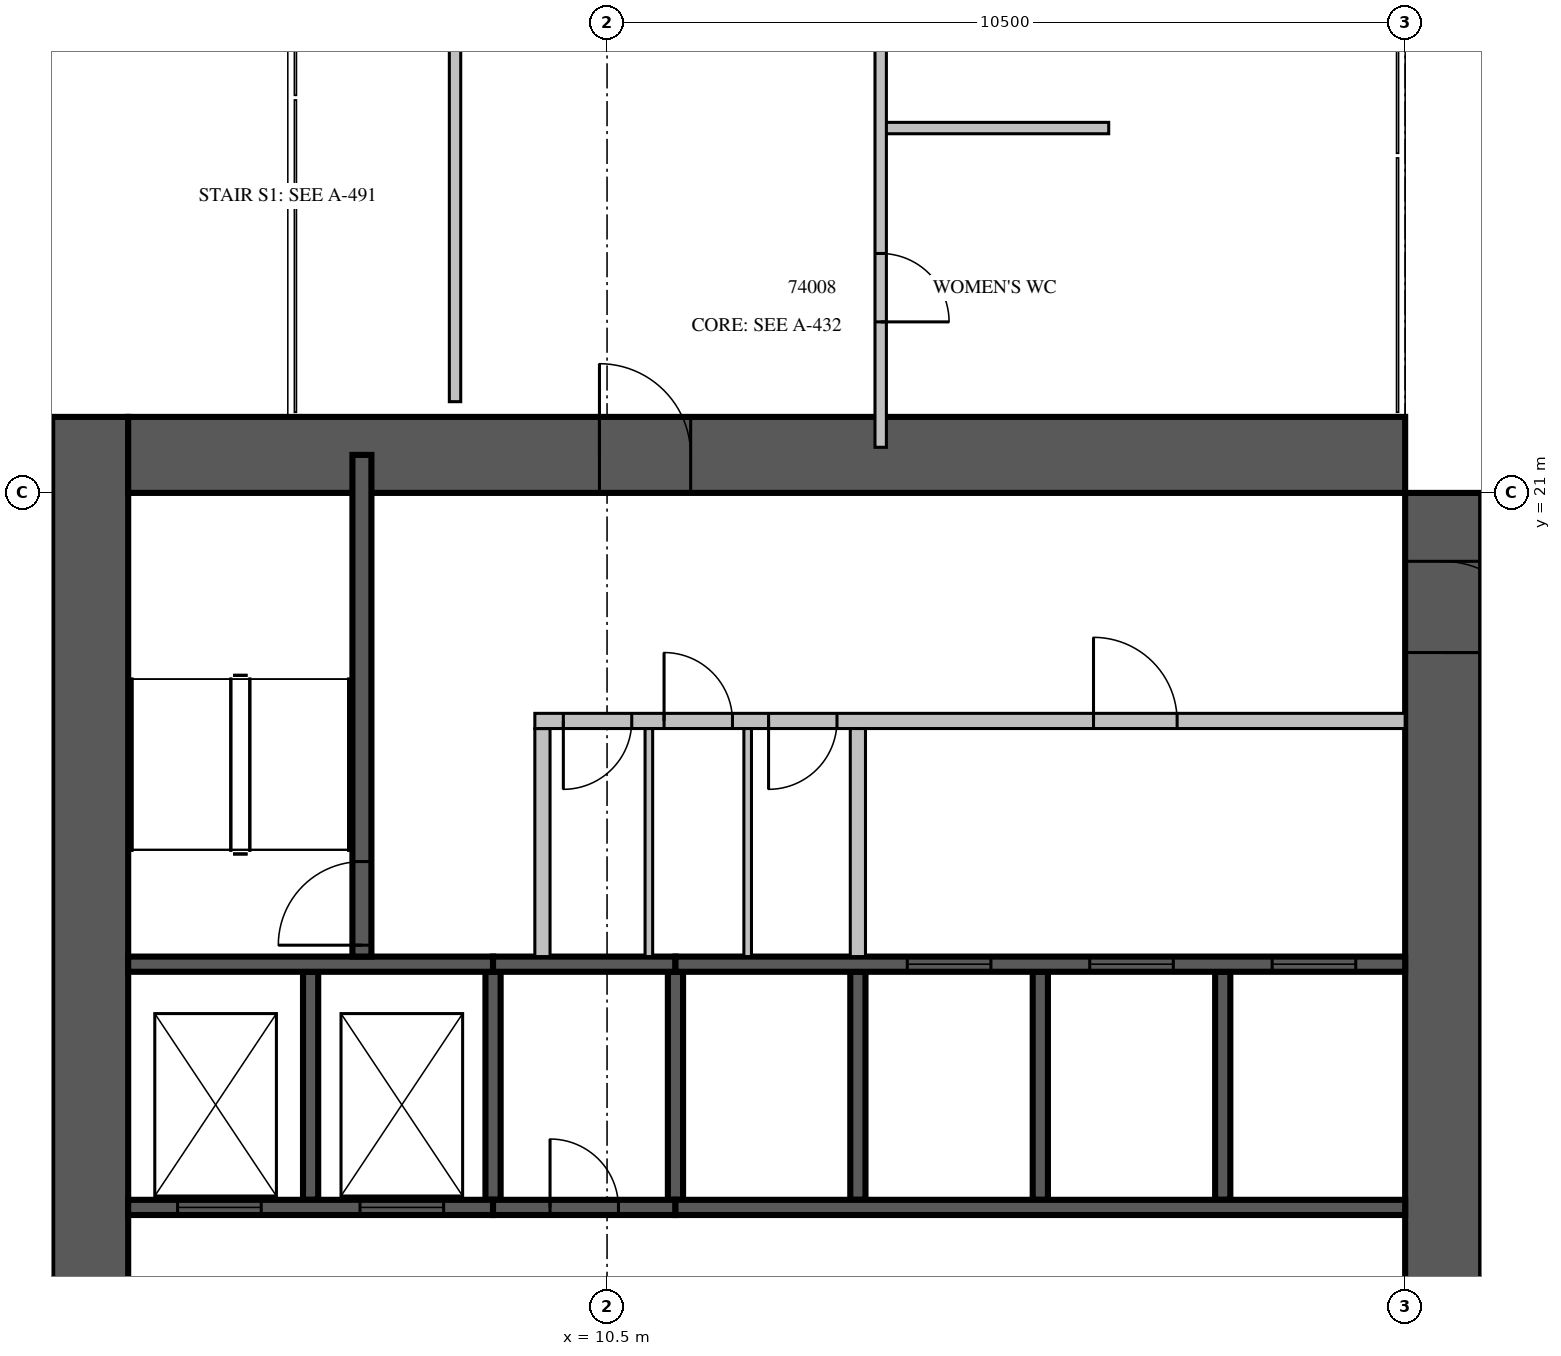
"""IFC4 building model, lengths in metres.
Left out: names, types, materials, properties, quantities, classifications, styles, units other than length and angle.
Written with IfcOpenShell. Run it as: python <this file> out.ifc"""

import sys

from ifc_helpers import new_model, si_unit, direction, frame, frame_2d, origin, place, context, subcontext, project, spatial, rectangle, extrude, source, transform, mapped, element, fill, save


model = new_model("IFC4")
c1 = context("Model", 3, precision=1e-05, world=origin(), true_north=direction((0.0, 1.0)))
c2 = subcontext(c1, "Body", "Model", "MODEL_VIEW")
j1 = project(units=[si_unit("LENGTHUNIT", "METRE"), si_unit("PLANEANGLEUNIT", "RADIAN")], contexts=[c1])
p1 = place(None, origin())
s1 = spatial("IfcSite", under=j1, at=p1, CompositionType="ELEMENT")
p2 = place(p1, origin())
s2 = spatial("IfcBuilding", under=s1, at=p2, CompositionType="ELEMENT")
p3 = place(p2, frame((0.0, 0.0, 170.3)))
s3 = spatial("IfcBuildingStorey", under=s2, at=p3, CompositionType="ELEMENT", Elevation=170.3)
p4 = place(p3, frame((3.7, 4.2, 0.0), z_axis=(0.0, 0.0, 1.0), x_axis=(0.0, 1.0, 0.0)))
e1 = element("IfcWall", 1, at=p4, inside=s3, PredefinedType="SHEAR", context=c2, shape_type="SweptSolid", body=[
    extrude(rectangle(XDim=17.8, YDim=1.0, at=frame_2d((8.9, 0.0))), origin(), (0.0, 0.0, 1.0), 7.5),
])
m1 = source(origin(), c2, "Body", "SweptSolid", [
    extrude(rectangle(XDim=2.2, YDim=2.1, at=frame_2d((1.1, 1.05))), frame((0.0, 0.51, 0.0), z_axis=(0.0, -1.0, 0.0), x_axis=(1.0, 0.0, 0.0)), (0.0, 0.0, 1.0), 1.02),
])
p5 = place(p4, frame((4.2, 0.0, 0.0)))
e2 = element("IfcOpeningElement", 2, at=p5, cuts=e1, PredefinedType="OPENING", context=c2, shape_type="MappedRepresentation", body=[
    mapped(m1, transform((0.0, 0.0, 0.0), scale=1.0)),
])
p6 = place(p3, frame((21.5, 4.2, 0.0), z_axis=(0.0, 0.0, 1.0), x_axis=(0.0, 1.0, 0.0)))
e3 = element("IfcWall", 3, at=p6, inside=s3, PredefinedType="SHEAR", context=c2, shape_type="SweptSolid", body=[
    extrude(rectangle(XDim=16.8, YDim=1.0, at=frame_2d((8.4, 0.0))), origin(), (0.0, 0.0, 1.0), 7.5),
])
p7 = place(p6, frame((4.2, 0.0, 0.0)))
e4 = element("IfcOpeningElement", 4, at=p7, cuts=e3, PredefinedType="OPENING", context=c2, shape_type="MappedRepresentation", body=[
    mapped(m1, transform((0.0, 0.0, 0.0), scale=1.0)),
])
m2 = source(origin(), c2, "Body", "SweptSolid", [
    extrude(rectangle(XDim=1.2, YDim=2.1, at=frame_2d((0.6, 1.05))), frame((0.0, 0.51, 0.0), z_axis=(0.0, -1.0, 0.0), x_axis=(1.0, 0.0, 0.0)), (0.0, 0.0, 1.0), 1.02),
])
p8 = place(p6, frame((14.7, 0.0, 0.0)))
e5 = element("IfcOpeningElement", 5, at=p8, cuts=e3, PredefinedType="OPENING", context=c2, shape_type="MappedRepresentation", body=[
    mapped(m2, transform((0.0, 0.0, 0.0), scale=1.0)),
])
m3 = source(origin(), c2, "Body", "SweptSolid", [
    extrude(rectangle(XDim=16.8, YDim=1.0, at=frame_2d((8.4, 0.0))), origin(), (0.0, 0.0, 1.0), 7.5),
])
p9 = place(p3, frame((4.2, 21.5, 0.0), z_axis=(0.0, 0.0, 1.0), x_axis=(1.0, 0.0, 0.0)))
e6 = element("IfcWall", 6, at=p9, inside=s3, PredefinedType="SHEAR", context=c2, shape_type="MappedRepresentation", body=[
    mapped(m3, transform((0.0, 0.0, 0.0), scale=1.0)),
])
p10 = place(p9, frame((6.2, 0.0, 0.0)))
e7 = element("IfcOpeningElement", 7, at=p10, cuts=e6, PredefinedType="OPENING", context=c2, shape_type="MappedRepresentation", body=[
    mapped(m2, transform((0.0, 0.0, 0.0), scale=1.0)),
])
m4 = source(origin(), c2, "Body", "SweptSolid", [
    extrude(rectangle(XDim=3.0, YDim=0.2, at=frame_2d((1.5, 0.0))), origin(), (0.0, 0.0, 1.0), 7.5),
])
p11 = place(p3, frame((6.6, 11.7, 0.0), z_axis=(0.0, 0.0, 1.0), x_axis=(0.0, 1.0, 0.0)))
e8 = element("IfcWall", 8, at=p11, inside=s3, PredefinedType="SOLIDWALL", context=c2, shape_type="MappedRepresentation", body=[
    mapped(m4, transform((0.0, 0.0, 0.0), scale=1.0)),
])
p12 = place(p3, frame((9.0, 11.7, 0.0), z_axis=(0.0, 0.0, 1.0), x_axis=(0.0, 1.0, 0.0)))
e9 = element("IfcWall", 9, at=p12, inside=s3, PredefinedType="SOLIDWALL", context=c2, shape_type="SweptSolid", body=[
    extrude(rectangle(XDim=3.0, YDim=0.2, at=frame_2d((1.5, 0.0))), origin(), (0.0, 0.0, 1.0), 7.1),
])
m5 = source(origin(), c2, "Body", "SweptSolid", [
    extrude(rectangle(XDim=3.0, YDim=0.2, at=frame_2d((1.5, 0.0))), origin(), (0.0, 0.0, 1.0), 7.1),
])
p13 = place(p3, frame((11.4, 11.7, 0.0), z_axis=(0.0, 0.0, 1.0), x_axis=(0.0, 1.0, 0.0)))
e10 = element("IfcWall", 10, at=p13, inside=s3, PredefinedType="SOLIDWALL", context=c2, shape_type="MappedRepresentation", body=[
    mapped(m5, transform((0.0, 0.0, 0.0), scale=1.0)),
])
for number, where, z_axis, x_axis in (
    (11, (13.8, 11.7, 0.0), (0.0, 0.0, 1.0), (0.0, 1.0, 0.0)),
    (12, (16.2, 11.7, 0.0), (0.0, 0.0, 1.0), (0.0, 1.0, 0.0)),
    (13, (18.6, 11.7, 0.0), (0.0, 0.0, 1.0), (0.0, 1.0, 0.0)),
):
    element("IfcWall", number, at=place(p3, frame(where, z_axis=z_axis, x_axis=x_axis)), inside=s3, PredefinedType="SOLIDWALL", context=c2, shape_type="MappedRepresentation", body=[
        mapped(m4, transform((0.0, 0.0, 0.0), scale=1.0)),
    ])
p14 = place(p3, frame((4.2, 11.6, 0.0), z_axis=(0.0, 0.0, 1.0), x_axis=(1.0, 0.0, 0.0)))
e14 = element("IfcWall", 14, at=p14, inside=s3, PredefinedType="SOLIDWALL", context=c2, shape_type="SweptSolid", body=[
    extrude(rectangle(XDim=4.8, YDim=0.2, at=frame_2d((2.4, 0.0))), origin(), (0.0, 0.0, 1.0), 7.5),
])
m6 = source(origin(), c2, "Body", "SweptSolid", [
    extrude(rectangle(XDim=1.1, YDim=2.1, at=frame_2d((0.55, 1.05))), frame((0.0, 0.11, 0.0), z_axis=(0.0, -1.0, 0.0), x_axis=(1.0, 0.0, 0.0)), (0.0, 0.0, 1.0), 0.22),
])
p15 = place(p14, frame((0.65, 0.0, 0.0)))
e15 = element("IfcOpeningElement", 15, at=p15, cuts=e14, PredefinedType="OPENING", context=c2, shape_type="MappedRepresentation", body=[
    mapped(m6, transform((0.0, 0.0, 0.0), scale=1.0)),
])
p16 = place(p14, frame((3.05, 0.0, 0.0)))
e16 = element("IfcOpeningElement", 16, at=p16, cuts=e14, PredefinedType="OPENING", context=c2, shape_type="MappedRepresentation", body=[
    mapped(m6, transform((0.0, 0.0, 0.0), scale=1.0)),
])
p17 = place(p3, frame((9.0, 11.6, 0.0), z_axis=(0.0, 0.0, 1.0), x_axis=(1.0, 0.0, 0.0)))
e17 = element("IfcWall", 17, at=p17, inside=s3, PredefinedType="SOLIDWALL", context=c2, shape_type="SweptSolid", body=[
    extrude(rectangle(XDim=2.4, YDim=0.2, at=frame_2d((1.2, 0.0))), origin(), (0.0, 0.0, 1.0), 7.1),
])
m7 = source(origin(), c2, "Body", "SweptSolid", [
    extrude(rectangle(XDim=0.9, YDim=2.1, at=frame_2d((0.45, 1.05))), frame((0.0, 0.11, 0.0), z_axis=(0.0, -1.0, 0.0), x_axis=(1.0, 0.0, 0.0)), (0.0, 0.0, 1.0), 0.22),
])
p18 = place(p17, frame((0.75, 0.0, 0.0)))
e18 = element("IfcOpeningElement", 18, at=p18, cuts=e17, PredefinedType="OPENING", context=c2, shape_type="MappedRepresentation", body=[
    mapped(m7, transform((0.0, 0.0, 0.0), scale=1.0)),
])
p19 = place(p3, frame((11.4, 11.6, 0.0), z_axis=(0.0, 0.0, 1.0), x_axis=(1.0, 0.0, 0.0)))
e19 = element("IfcWall", 19, at=p19, inside=s3, PredefinedType="SOLIDWALL", context=c2, shape_type="SweptSolid", body=[
    extrude(rectangle(XDim=9.6, YDim=0.2, at=frame_2d((4.8, 0.0))), origin(), (0.0, 0.0, 1.0), 7.5),
])
m8 = source(origin(), c2, "Body", "SweptSolid", [
    extrude(rectangle(XDim=4.8, YDim=0.2, at=frame_2d((2.4, 0.0))), origin(), (0.0, 0.0, 1.0), 7.5),
])
p20 = place(p3, frame((4.2, 14.8, 0.0), z_axis=(0.0, 0.0, 1.0), x_axis=(1.0, 0.0, 0.0)))
e20 = element("IfcWall", 20, at=p20, inside=s3, PredefinedType="SOLIDWALL", context=c2, shape_type="MappedRepresentation", body=[
    mapped(m8, transform((0.0, 0.0, 0.0), scale=1.0)),
])
m9 = source(origin(), c2, "Body", "SweptSolid", [
    extrude(rectangle(XDim=2.4, YDim=0.2, at=frame_2d((1.2, 0.0))), origin(), (0.0, 0.0, 1.0), 7.1),
])
p21 = place(p3, frame((9.0, 14.8, 0.0), z_axis=(0.0, 0.0, 1.0), x_axis=(1.0, 0.0, 0.0)))
e21 = element("IfcWall", 21, at=p21, inside=s3, PredefinedType="SOLIDWALL", context=c2, shape_type="MappedRepresentation", body=[
    mapped(m9, transform((0.0, 0.0, 0.0), scale=1.0)),
])
m10 = source(origin(), c2, "Body", "SweptSolid", [
    extrude(rectangle(XDim=9.6, YDim=0.2, at=frame_2d((4.8, 0.0))), origin(), (0.0, 0.0, 1.0), 7.5),
])
p22 = place(p3, frame((11.4, 14.8, 0.0), z_axis=(0.0, 0.0, 1.0), x_axis=(1.0, 0.0, 0.0)))
e22 = element("IfcWall", 22, at=p22, inside=s3, PredefinedType="SOLIDWALL", context=c2, shape_type="MappedRepresentation", body=[
    mapped(m10, transform((0.0, 0.0, 0.0), scale=1.0)),
])
p23 = place(p22, frame((3.05, 0.0, 0.0)))
e23 = element("IfcOpeningElement", 23, at=p23, cuts=e22, PredefinedType="OPENING", context=c2, shape_type="MappedRepresentation", body=[
    mapped(m6, transform((0.0, 0.0, 0.0), scale=1.0)),
])
p24 = place(p22, frame((5.45, 0.0, 0.0)))
e24 = element("IfcOpeningElement", 24, at=p24, cuts=e22, PredefinedType="OPENING", context=c2, shape_type="MappedRepresentation", body=[
    mapped(m6, transform((0.0, 0.0, 0.0), scale=1.0)),
])
p25 = place(p22, frame((7.85, 0.0, 0.0)))
e25 = element("IfcOpeningElement", 25, at=p25, cuts=e22, PredefinedType="OPENING", context=c2, shape_type="MappedRepresentation", body=[
    mapped(m6, transform((0.0, 0.0, 0.0), scale=1.0)),
])
p26 = place(p3, frame((7.275, 14.9, 0.0), z_axis=(0.0, 0.0, 1.0), x_axis=(0.0, 1.0, 0.0)))
e26 = element("IfcWall", 26, at=p26, inside=s3, PredefinedType="SOLIDWALL", context=c2, shape_type="SweptSolid", body=[
    extrude(rectangle(XDim=6.6, YDim=0.25, at=frame_2d((3.3, 0.0))), origin(), (0.0, 0.0, 1.0), 7.1),
])
m11 = source(origin(), c2, "Body", "SweptSolid", [
    extrude(rectangle(XDim=1.1, YDim=2.1, at=frame_2d((0.55, 1.05))), frame((0.0, 0.135, 0.0), z_axis=(0.0, -1.0, 0.0), x_axis=(1.0, 0.0, 0.0)), (0.0, 0.0, 1.0), 0.27),
])
p27 = place(p26, frame((0.15, 0.0, 0.0)))
e27 = element("IfcOpeningElement", 27, at=p27, cuts=e26, PredefinedType="OPENING", context=c2, shape_type="MappedRepresentation", body=[
    mapped(m11, transform((0.0, 0.0, 0.0), scale=1.0)),
])
p28 = place(p3, frame((9.65, 14.9, 0.0), z_axis=(0.0, 0.0, 1.0), x_axis=(0.0, 1.0, 0.0)))
e28 = element("IfcWall", 28, at=p28, inside=s3, PredefinedType="PARTITIONING", context=c2, shape_type="SweptSolid", body=[
    extrude(rectangle(XDim=3.0, YDim=0.2, at=frame_2d((1.5, 0.0))), origin(), (0.0, 0.0, 1.0), 7.1),
])
p29 = place(p3, frame((9.55, 18.0, 0.0), z_axis=(0.0, 0.0, 1.0), x_axis=(1.0, 0.0, 0.0)))
e29 = element("IfcWall", 29, at=p29, inside=s3, PredefinedType="PARTITIONING", context=c2, shape_type="SweptSolid", body=[
    extrude(rectangle(XDim=11.45, YDim=0.2, at=frame_2d((5.725, 0.0))), origin(), (0.0, 0.0, 1.0), 7.1),
])
p30 = place(p29, frame((0.375, 0.0, 0.0)))
e30 = element("IfcOpeningElement", 30, at=p30, cuts=e29, PredefinedType="OPENING", context=c2, shape_type="MappedRepresentation", body=[
    mapped(m7, transform((0.0, 0.0, 0.0), scale=1.0)),
])
p31 = place(p29, frame((1.7, 0.0, 0.0)))
e31 = element("IfcOpeningElement", 31, at=p31, cuts=e29, PredefinedType="OPENING", context=c2, shape_type="MappedRepresentation", body=[
    mapped(m7, transform((0.0, 0.0, 0.0), scale=1.0)),
])
p32 = place(p29, frame((3.075, 0.0, 0.0)))
e32 = element("IfcOpeningElement", 32, at=p32, cuts=e29, PredefinedType="OPENING", context=c2, shape_type="MappedRepresentation", body=[
    mapped(m7, transform((0.0, 0.0, 0.0), scale=1.0)),
])
p33 = place(p29, frame((7.35, 0.0, 0.0)))
e33 = element("IfcOpeningElement", 33, at=p33, cuts=e29, PredefinedType="OPENING", context=c2, shape_type="MappedRepresentation", body=[
    mapped(m6, transform((0.0, 0.0, 0.0), scale=1.0)),
])
m12 = source(origin(), c2, "Body", "SweptSolid", [
    extrude(rectangle(XDim=3.0, YDim=0.2, at=frame_2d((1.5, 0.0))), origin(), (0.0, 0.0, 1.0), 7.1),
])
p34 = place(p3, frame((13.8, 14.9, 0.0), z_axis=(0.0, 0.0, 1.0), x_axis=(0.0, 1.0, 0.0)))
e34 = element("IfcWall", 34, at=p34, inside=s3, PredefinedType="PARTITIONING", context=c2, shape_type="MappedRepresentation", body=[
    mapped(m12, transform((0.0, 0.0, 0.0), scale=1.0)),
])
p35 = place(p3, frame((11.05, 14.9, 0.0), z_axis=(0.0, 0.0, 1.0), x_axis=(0.0, 1.0, 0.0)))
e35 = element("IfcWall", 35, at=p35, inside=s3, PredefinedType="PARTITIONING", context=c2, shape_type="SweptSolid", body=[
    extrude(rectangle(XDim=3.0, YDim=0.1, at=frame_2d((1.5, 0.0))), origin(), (0.0, 0.0, 1.0), 7.1),
])
m13 = source(origin(), c2, "Body", "SweptSolid", [
    extrude(rectangle(XDim=3.0, YDim=0.1, at=frame_2d((1.5, 0.0))), origin(), (0.0, 0.0, 1.0), 7.1),
])
p36 = place(p3, frame((12.35, 14.9, 0.0), z_axis=(0.0, 0.0, 1.0), x_axis=(0.0, 1.0, 0.0)))
e36 = element("IfcWall", 36, at=p36, inside=s3, PredefinedType="PARTITIONING", context=c2, shape_type="MappedRepresentation", body=[
    mapped(m13, transform((0.0, 0.0, 0.0), scale=1.0)),
])
p37 = place(p3, frame((14.1, 25.8, 0.0), z_axis=(0.0, 0.0, 1.0), x_axis=(1.0, 0.0, 0.0)))
e37 = element("IfcWall", 37, at=p37, inside=s3, PredefinedType="PARTITIONING", context=c2, shape_type="SweptSolid", body=[
    extrude(rectangle(XDim=3.0, YDim=0.15, at=frame_2d((1.5, 0.0))), origin(), (0.0, 0.0, 1.0), 7.1),
])
m14 = source(origin(), c2, "Body", "SweptSolid", [
    extrude(rectangle(XDim=16.2, YDim=0.15, at=frame_2d((8.1, 0.0))), origin(), (0.0, 0.0, 1.0), 7.1),
])
p38 = place(p3, frame((8.5, 22.2, 0.0), z_axis=(0.0, 0.0, 1.0), x_axis=(0.0, 1.0, 0.0)))
e38 = element("IfcWall", 38, at=p38, inside=s3, PredefinedType="PARTITIONING", context=c2, shape_type="MappedRepresentation", body=[
    mapped(m14, transform((0.0, 0.0, 0.0), scale=1.0)),
])
m15 = source(origin(), c2, "Body", "SweptSolid", [
    extrude(rectangle(XDim=0.9, YDim=2.1, at=frame_2d((0.45, 1.05))), frame((0.0, 0.085, 0.0), z_axis=(0.0, -1.0, 0.0), x_axis=(1.0, 0.0, 0.0)), (0.0, 0.0, 1.0), 0.17),
])
p39 = place(p38, frame((7.95, 0.0, 0.0)))
e39 = element("IfcOpeningElement", 39, at=p39, cuts=e38, PredefinedType="OPENING", context=c2, shape_type="MappedRepresentation", body=[
    mapped(m15, transform((0.0, 0.0, 0.0), scale=1.0)),
])
p40 = place(p3, frame((14.1, 21.6, 0.0), z_axis=(0.0, 0.0, 1.0), x_axis=(0.0, 1.0, 0.0)))
e40 = element("IfcWall", 40, at=p40, inside=s3, PredefinedType="PARTITIONING", context=c2, shape_type="SweptSolid", body=[
    extrude(rectangle(XDim=12.6, YDim=0.15, at=frame_2d((6.3, 0.0))), origin(), (0.0, 0.0, 1.0), 7.1),
])
p41 = place(p40, frame((1.65, 0.0, 0.0)))
e41 = element("IfcOpeningElement", 41, at=p41, cuts=e40, PredefinedType="OPENING", context=c2, shape_type="MappedRepresentation", body=[
    mapped(m15, transform((0.0, 0.0, 0.0), scale=1.0)),
])
p42 = place(p40, frame((5.85, 0.0, 0.0)))
e42 = element("IfcOpeningElement", 42, at=p42, cuts=e40, PredefinedType="OPENING", context=c2, shape_type="MappedRepresentation", body=[
    mapped(m15, transform((0.0, 0.0, 0.0), scale=1.0)),
])
p43 = place(p40, frame((10.05, 0.0, 0.0)))
e43 = element("IfcOpeningElement", 43, at=p43, cuts=e40, PredefinedType="OPENING", context=c2, shape_type="MappedRepresentation", body=[
    mapped(m15, transform((0.0, 0.0, 0.0), scale=1.0)),
])
m16 = source(origin(), c2, "Body", "SweptSolid", [
    extrude(rectangle(XDim=1.1, YDim=2.1, at=frame_2d((0.55, 1.05))), frame((0.0, 0.025, 0.0), z_axis=(0.0, -1.0, 0.0), x_axis=(1.0, 0.0, 0.0)), (0.0, 0.0, 1.0), 0.05),
])
p44 = place(p15, origin())
e44 = element("IfcDoor", 44, at=p44, inside=s3, OperationType="SLIDING_TO_LEFT", PredefinedType="DOOR", context=c2, shape_type="MappedRepresentation", body=[
    mapped(m16, transform((0.0, 0.0, 0.0), scale=1.0)),
])
fill(e15, e44)
p45 = place(p16, origin())
e45 = element("IfcDoor", 45, at=p45, inside=s3, OperationType="SLIDING_TO_LEFT", PredefinedType="DOOR", context=c2, shape_type="MappedRepresentation", body=[
    mapped(m16, transform((0.0, 0.0, 0.0), scale=1.0)),
])
fill(e16, e45)
m17 = source(origin(), c2, "Body", "SweptSolid", [
    extrude(rectangle(XDim=0.9, YDim=2.1, at=frame_2d((0.45, 1.05))), frame((0.0, 0.025, 0.0), z_axis=(0.0, -1.0, 0.0), x_axis=(1.0, 0.0, 0.0)), (0.0, 0.0, 1.0), 0.05),
])
p46 = place(p18, origin())
e46 = element("IfcDoor", 46, at=p46, inside=s3, OperationType="SINGLE_SWING_LEFT", PredefinedType="DOOR", context=c2, shape_type="MappedRepresentation", body=[
    mapped(m17, transform((0.0, 0.0, 0.0), scale=1.0)),
])
fill(e18, e46)
p47 = place(p23, origin())
e47 = element("IfcDoor", 47, at=p47, inside=s3, OperationType="SLIDING_TO_LEFT", PredefinedType="DOOR", context=c2, shape_type="MappedRepresentation", body=[
    mapped(m16, transform((0.0, 0.0, 0.0), scale=1.0)),
])
fill(e23, e47)
p48 = place(p24, origin())
e48 = element("IfcDoor", 48, at=p48, inside=s3, OperationType="SLIDING_TO_LEFT", PredefinedType="DOOR", context=c2, shape_type="MappedRepresentation", body=[
    mapped(m16, transform((0.0, 0.0, 0.0), scale=1.0)),
])
fill(e24, e48)
p49 = place(p25, origin())
e49 = element("IfcDoor", 49, at=p49, inside=s3, OperationType="SLIDING_TO_LEFT", PredefinedType="DOOR", context=c2, shape_type="MappedRepresentation", body=[
    mapped(m16, transform((0.0, 0.0, 0.0), scale=1.0)),
])
fill(e25, e49)
p50 = place(p27, origin())
e50 = element("IfcDoor", 50, at=p50, inside=s3, OperationType="SINGLE_SWING_LEFT", PredefinedType="DOOR", context=c2, shape_type="MappedRepresentation", body=[
    mapped(m16, transform((0.0, 0.0, 0.0), scale=1.0)),
])
fill(e27, e50)
p51 = place(p30, origin())
e51 = element("IfcDoor", 51, at=p51, inside=s3, OperationType="SINGLE_SWING_RIGHT", PredefinedType="DOOR", context=c2, shape_type="MappedRepresentation", body=[
    mapped(m17, transform((0.0, 0.0, 0.0), scale=1.0)),
])
fill(e30, e51)
p52 = place(p31, origin())
e52 = element("IfcDoor", 52, at=p52, inside=s3, OperationType="SINGLE_SWING_LEFT", PredefinedType="DOOR", context=c2, shape_type="MappedRepresentation", body=[
    mapped(m17, transform((0.0, 0.0, 0.0), scale=1.0)),
])
fill(e31, e52)
p53 = place(p32, origin())
e53 = element("IfcDoor", 53, at=p53, inside=s3, OperationType="SINGLE_SWING_RIGHT", PredefinedType="DOOR", context=c2, shape_type="MappedRepresentation", body=[
    mapped(m17, transform((0.0, 0.0, 0.0), scale=1.0)),
])
fill(e32, e53)
p54 = place(p33, origin())
e54 = element("IfcDoor", 54, at=p54, inside=s3, OperationType="SINGLE_SWING_LEFT", PredefinedType="DOOR", context=c2, shape_type="MappedRepresentation", body=[
    mapped(m16, transform((0.0, 0.0, 0.0), scale=1.0)),
])
fill(e33, e54)
m18 = source(origin(), c2, "Body", "SweptSolid", [
    extrude(rectangle(XDim=1.2, YDim=2.1, at=frame_2d((0.6, 1.05))), frame((0.0, 0.025, 0.0), z_axis=(0.0, -1.0, 0.0), x_axis=(1.0, 0.0, 0.0)), (0.0, 0.0, 1.0), 0.05),
])
p55 = place(p10, origin())
e55 = element("IfcDoor", 55, at=p55, inside=s3, OperationType="SINGLE_SWING_LEFT", PredefinedType="DOOR", context=c2, shape_type="MappedRepresentation", body=[
    mapped(m18, transform((0.0, 0.0, 0.0), scale=1.0)),
])
fill(e7, e55)
p56 = place(p8, origin())
e56 = element("IfcDoor", 56, at=p56, inside=s3, OperationType="SINGLE_SWING_RIGHT", PredefinedType="DOOR", context=c2, shape_type="MappedRepresentation", body=[
    mapped(m18, transform((0.0, 0.0, 0.0), scale=1.0)),
])
fill(e5, e56)
p57 = place(p41, origin())
e57 = element("IfcDoor", 57, at=p57, inside=s3, OperationType="SINGLE_SWING_RIGHT", PredefinedType="DOOR", context=c2, shape_type="MappedRepresentation", body=[
    mapped(m17, transform((0.0, 0.0, 0.0), scale=1.0)),
])
fill(e41, e57)
save(model, sys.argv[1])
